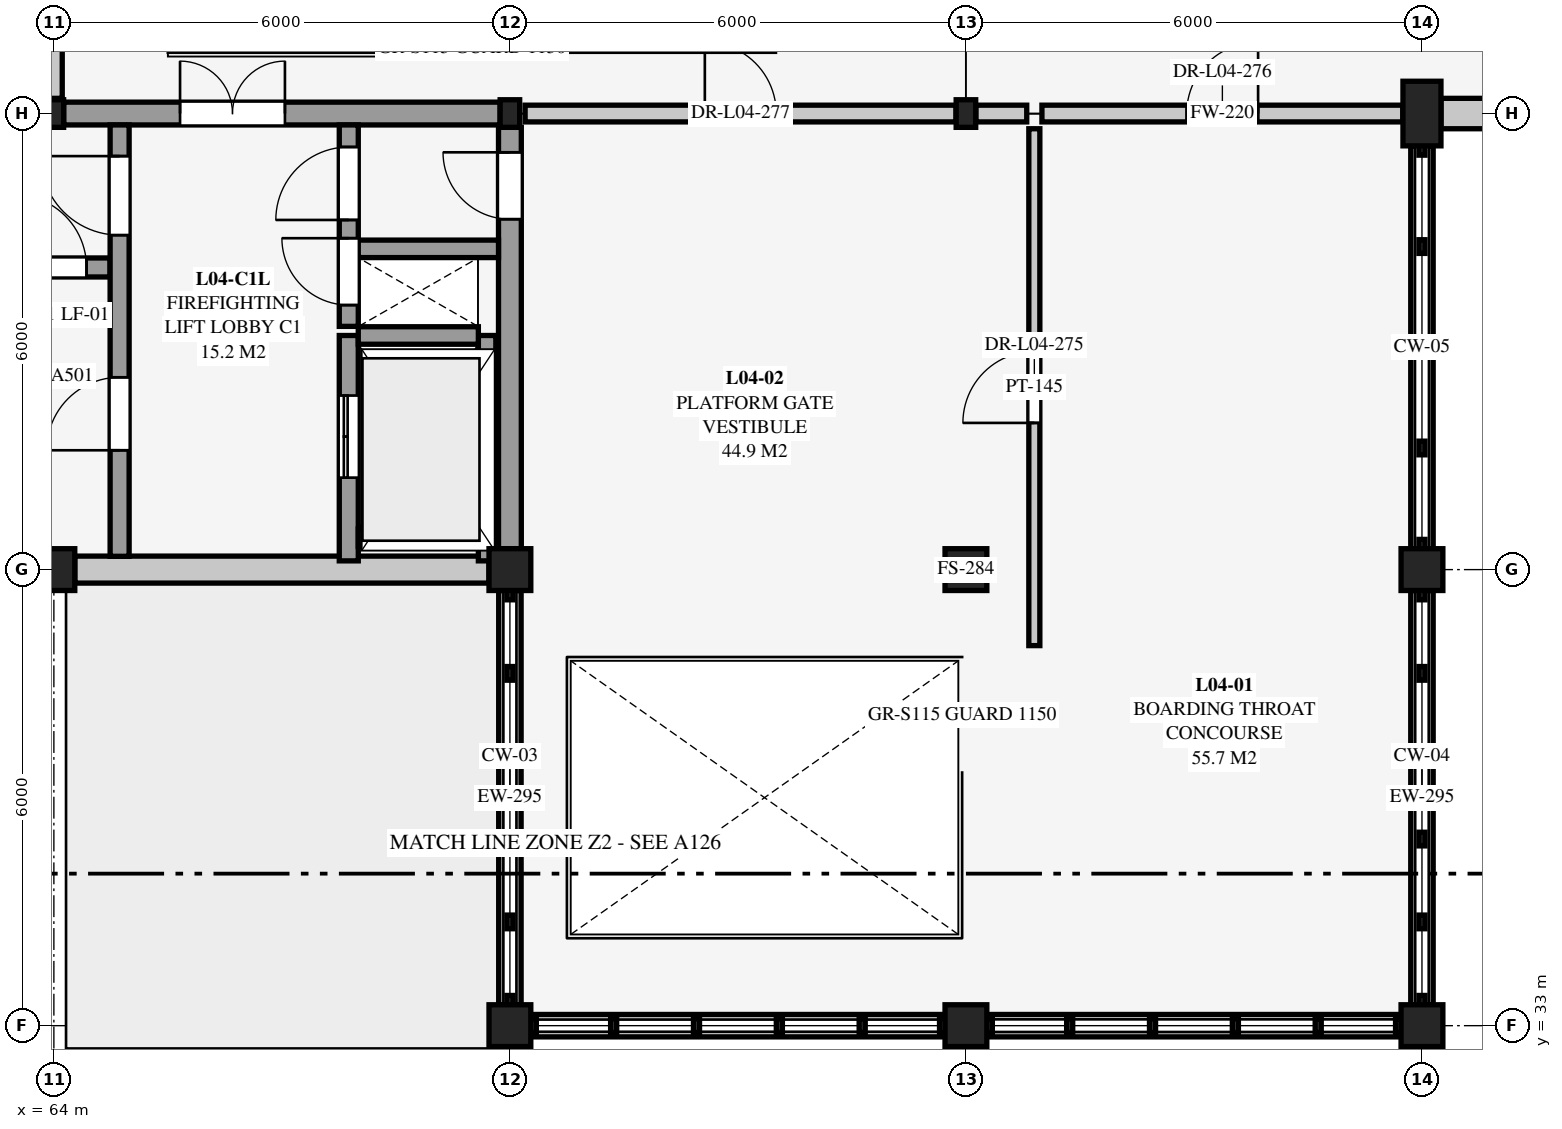
"""IFC4 building model, lengths in metres.
Left out: names, types, materials, properties, quantities, classifications, styles, units other than length and angle.
Written with IfcOpenShell. Run it as: python <this file> out.ifc"""

import sys

from ifc_helpers import new_model, si_unit, direction, frame, frame_2d, origin, origin_2d, place, context, subcontext, project, spatial, rectangle, i_section, extrude, element, fill, save


model = new_model("IFC4")
c1 = context("Model", 3, precision=1e-05, world=origin(), true_north=direction((0.0, 1.0)))
c2 = subcontext(c1, "Body", "Model", "MODEL_VIEW")
j1 = project(units=[si_unit("LENGTHUNIT", "METRE"), si_unit("PLANEANGLEUNIT", "RADIAN")], contexts=[c1])
p1 = place(None, origin())
s1 = spatial("IfcSite", under=j1, at=p1, CompositionType="ELEMENT")
p2 = place(p1, origin())
s2 = spatial("IfcBuilding", under=s1, at=p2, CompositionType="ELEMENT")
p3 = place(p2, frame((0.0, 0.0, 13.5)))
s3 = spatial("IfcBuildingStorey", under=s2, at=p3, CompositionType="ELEMENT", Elevation=13.5)
p4 = place(p3, frame((64.0, 39.0, 0.0), z_axis=(0.0, 0.0, 1.0), x_axis=(1.0, 0.0, 0.0)))
e1 = element("IfcColumn", 1, at=p4, inside=s3, PredefinedType="COLUMN", context=c2, shape_type="SweptSolid", body=[
    extrude(rectangle(XDim=0.55, YDim=0.55, at=origin_2d()), origin(), (0.0, 0.0, 1.0), 4.5),
])
p5 = place(p3, frame((64.0, 45.0, 0.0), z_axis=(0.0, 0.0, 1.0), x_axis=(1.0, 0.0, 0.0)))
e2 = element("IfcColumn", 2, at=p5, inside=s3, PredefinedType="COLUMN", context=c2, shape_type="SweptSolid", body=[
    extrude(i_section(OverallWidth=0.257, OverallDepth=0.363, WebThickness=0.013, FlangeThickness=0.022, at=origin_2d()), origin(), (0.0, 0.0, 1.0), 4.5),
])
for number, where, z_axis, x_axis in (
    (3, (70.0, 33.0, 0.0), (0.0, 0.0, 1.0), (1.0, 0.0, 0.0)),
    (4, (70.0, 39.0, 0.0), (0.0, 0.0, 1.0), (1.0, 0.0, 0.0)),
):
    element("IfcColumn", number, at=place(p3, frame(where, z_axis=z_axis, x_axis=x_axis)), inside=s3, PredefinedType="COLUMN", context=c2, shape_type="SweptSolid", body=[
        extrude(rectangle(XDim=0.55, YDim=0.55, at=origin_2d()), origin(), (0.0, 0.0, 1.0), 4.5),
    ])
p6 = place(p3, frame((70.0, 45.0, 0.0), z_axis=(0.0, 0.0, 1.0), x_axis=(1.0, 0.0, 0.0)))
e5 = element("IfcColumn", 5, at=p6, inside=s3, PredefinedType="COLUMN", context=c2, shape_type="SweptSolid", body=[
    extrude(i_section(OverallWidth=0.257, OverallDepth=0.363, WebThickness=0.013, FlangeThickness=0.022, at=origin_2d()), origin(), (0.0, 0.0, 1.0), 4.5),
])
for number, where, z_axis, x_axis in (
    (6, (76.0, 33.0, 0.0), (0.0, 0.0, 1.0), (1.0, 0.0, 0.0)),
    (7, (76.0, 39.0, 0.0), (0.0, 0.0, 1.0), (1.0, 0.0, 0.0)),
):
    element("IfcColumn", number, at=place(p3, frame(where, z_axis=z_axis, x_axis=x_axis)), inside=s3, PredefinedType="COLUMN", context=c2, shape_type="SweptSolid", body=[
        extrude(rectangle(XDim=0.55, YDim=0.55, at=origin_2d()), origin(), (0.0, 0.0, 1.0), 4.5),
    ])
p7 = place(p3, frame((76.0, 45.0, 0.0), z_axis=(0.0, 0.0, 1.0), x_axis=(1.0, 0.0, 0.0)))
e8 = element("IfcColumn", 8, at=p7, inside=s3, PredefinedType="COLUMN", context=c2, shape_type="SweptSolid", body=[
    extrude(i_section(OverallWidth=0.257, OverallDepth=0.363, WebThickness=0.013, FlangeThickness=0.022, at=origin_2d()), origin(), (0.0, 0.0, 1.0), 4.5),
])
for number, where, z_axis, x_axis in (
    (9, (82.0, 33.0, 0.0), (0.0, 0.0, 1.0), (1.0, 0.0, 0.0)),
    (10, (82.0, 39.0, 0.0), (0.0, 0.0, 1.0), (1.0, 0.0, 0.0)),
):
    element("IfcColumn", number, at=place(p3, frame(where, z_axis=z_axis, x_axis=x_axis)), inside=s3, PredefinedType="COLUMN", context=c2, shape_type="SweptSolid", body=[
        extrude(rectangle(XDim=0.55, YDim=0.55, at=origin_2d()), origin(), (0.0, 0.0, 1.0), 4.5),
    ])
p8 = place(p3, frame((82.0, 45.0, 0.0), z_axis=(0.0, 0.0, 1.0), x_axis=(1.0, 0.0, 0.0)))
e11 = element("IfcColumn", 11, at=p8, inside=s3, PredefinedType="PILASTER", context=c2, shape_type="SweptSolid", body=[
    extrude(rectangle(XDim=0.5, YDim=0.85, at=origin_2d()), origin(), (0.0, 0.0, 1.0), 4.5),
])
p9 = place(p3, frame((69.725, 39.0, 0.0), z_axis=(0.0, 0.0, 1.0), x_axis=(-1.0, 0.0, 0.0)))
e12 = element("IfcWall", 12, at=p9, inside=s3, PredefinedType="SOLIDWALL", context=c2, shape_type="SweptSolid", body=[
    extrude(rectangle(XDim=5.45, YDim=0.355, at=frame_2d((2.725, 0.0))), origin(), (0.0, 0.0, 1.0), 3.741),
])
p10 = place(p3, frame((75.725, 33.0, 0.0), z_axis=(0.0, 0.0, 1.0), x_axis=(-1.0, 0.0, 0.0)))
e13 = element("IfcWall", 13, at=p10, inside=s3, PredefinedType="SOLIDWALL", context=c2, shape_type="SweptSolid", body=[
    extrude(rectangle(XDim=5.45, YDim=0.295, at=frame_2d((2.725, 0.0))), origin(), (0.0, 0.0, 1.0), 0.16),
])
p11 = place(p3, frame((81.725, 33.0, 0.0), z_axis=(0.0, 0.0, 1.0), x_axis=(-1.0, 0.0, 0.0)))
e14 = element("IfcWall", 14, at=p11, inside=s3, PredefinedType="SOLIDWALL", context=c2, shape_type="SweptSolid", body=[
    extrude(rectangle(XDim=5.45, YDim=0.295, at=frame_2d((2.725, 0.0))), origin(), (0.0, 0.0, 1.0), 0.21),
])
p12 = place(p3, frame((70.0, 33.275, 0.0), z_axis=(0.0, 0.0, 1.0), x_axis=(0.0, 1.0, 0.0)))
e15 = element("IfcWall", 15, at=p12, inside=s3, PredefinedType="SOLIDWALL", context=c2, shape_type="SweptSolid", body=[
    extrude(rectangle(XDim=5.45, YDim=0.295, at=frame_2d((2.725, 0.0))), origin(), (0.0, 0.0, 1.0), 0.26),
])
p13 = place(p3, frame((82.0, 38.725, 0.0), z_axis=(0.0, 0.0, 1.0), x_axis=(0.0, -1.0, 0.0)))
e16 = element("IfcWall", 16, at=p13, inside=s3, PredefinedType="SOLIDWALL", context=c2, shape_type="SweptSolid", body=[
    extrude(rectangle(XDim=5.45, YDim=0.295, at=frame_2d((2.725, 0.0))), origin(), (0.0, 0.0, 1.0), 0.31),
])
p14 = place(p3, frame((82.0, 44.575, 0.0), z_axis=(0.0, 0.0, 1.0), x_axis=(0.0, -1.0, 0.0)))
e17 = element("IfcWall", 17, at=p14, inside=s3, PredefinedType="SOLIDWALL", context=c2, shape_type="SweptSolid", body=[
    extrude(rectangle(XDim=5.3, YDim=0.295, at=frame_2d((2.65, 0.0))), origin(), (0.0, 0.0, 1.0), 0.36),
])
p15 = place(p3, frame((87.75, 45.0, 0.0), z_axis=(0.0, 0.0, 1.0), x_axis=(-1.0, 0.0, 0.0)))
e18 = element("IfcWall", 18, at=p15, inside=s3, PredefinedType="SOLIDWALL", context=c2, shape_type="SweptSolid", body=[
    extrude(rectangle(XDim=5.5, YDim=0.4, at=frame_2d((2.75, 0.0))), origin(), (0.0, 0.0, 1.0), 8.593),
])
p16 = place(p15, frame((2.1, 0.0, 1.3)))
e19 = element("IfcOpeningElement", 19, at=p16, cuts=e18, PredefinedType="OPENING", context=c2, shape_type="SweptSolid", body=[
    extrude(rectangle(XDim=1.3, YDim=1.45, at=frame_2d((0.65, 0.725))), frame((0.0, 0.21, 0.0), z_axis=(0.0, -1.0, 0.0), x_axis=(1.0, 0.0, 0.0)), (0.0, 0.0, 1.0), 0.42),
])
p17 = place(p3, frame((64.128, 45.0, 0.0), z_axis=(0.0, 0.0, 1.0), x_axis=(1.0, 0.0, 0.0)))
e20 = element("IfcWall", 20, at=p17, inside=s3, PredefinedType="SHEAR", context=c2, shape_type="SweptSolid", body=[
    extrude(rectangle(XDim=5.743, YDim=0.3, at=frame_2d((2.872, 0.0))), origin(), (0.0, 0.0, 1.0), 4.204),
])
p18 = place(p17, frame((1.531, 0.0, 0.0)))
e21 = element("IfcOpeningElement", 21, at=p18, cuts=e20, PredefinedType="OPENING", context=c2, shape_type="SweptSolid", body=[
    extrude(rectangle(XDim=1.38, YDim=2.16, at=frame_2d((0.69, 1.08))), frame((0.0, 0.16, 0.0), z_axis=(0.0, -1.0, 0.0), x_axis=(1.0, 0.0, 0.0)), (0.0, 0.0, 1.0), 0.32),
])
p19 = place(p3, frame((70.0, 39.275, 0.0), z_axis=(0.0, 0.0, 1.0), x_axis=(0.0, 1.0, 0.0)))
e22 = element("IfcWall", 22, at=p19, inside=s3, PredefinedType="SHEAR", context=c2, shape_type="SweptSolid", body=[
    extrude(rectangle(XDim=5.544, YDim=0.3, at=frame_2d((2.772, 0.0))), origin(), (0.0, 0.0, 1.0), 4.204),
])
p20 = place(p19, frame((4.335, 0.0, 0.0)))
e23 = element("IfcOpeningElement", 23, at=p20, cuts=e22, PredefinedType="OPENING", context=c2, shape_type="SweptSolid", body=[
    extrude(rectangle(XDim=0.88, YDim=2.08, at=frame_2d((0.44, 1.04))), frame((0.0, 0.16, 0.0), z_axis=(0.0, -1.0, 0.0), x_axis=(1.0, 0.0, 0.0)), (0.0, 0.0, 1.0), 0.32),
])
p21 = place(p3, frame((63.16, 42.975, 0.0), z_axis=(0.0, 0.0, 1.0), x_axis=(1.0, 0.0, 0.0)))
e24 = element("IfcWall", 24, at=p21, inside=s3, PredefinedType="SHEAR", context=c2, shape_type="SweptSolid", body=[
    extrude(rectangle(XDim=1.58, YDim=0.25, at=frame_2d((0.79, 0.0))), origin(), (0.0, 0.0, 1.0), 4.204),
])
p22 = place(p21, frame((0.31, 0.0, 0.0)))
e25 = element("IfcOpeningElement", 25, at=p22, cuts=e24, PredefinedType="OPENING", context=c2, shape_type="SweptSolid", body=[
    extrude(rectangle(XDim=0.96, YDim=2.12, at=frame_2d((0.48, 1.06))), frame((0.0, 0.135, 0.0), z_axis=(0.0, -1.0, 0.0), x_axis=(1.0, 0.0, 0.0)), (0.0, 0.0, 1.0), 0.27),
])
p23 = place(p3, frame((64.865, 39.175, 0.0), z_axis=(0.0, 0.0, 1.0), x_axis=(0.0, 1.0, 0.0)))
e26 = element("IfcWall", 26, at=p23, inside=s3, PredefinedType="SHEAR", context=c2, shape_type="SweptSolid", body=[
    extrude(rectangle(XDim=5.675, YDim=0.25, at=frame_2d((2.837, 0.0))), origin(), (0.0, 0.0, 1.0), 4.204),
])
p24 = place(p23, frame((4.225, 0.0, 0.0)))
e27 = element("IfcOpeningElement", 27, at=p24, cuts=e26, PredefinedType="OPENING", context=c2, shape_type="SweptSolid", body=[
    extrude(rectangle(XDim=1.04, YDim=2.14, at=frame_2d((0.52, 1.07))), frame((0.0, 0.135, 0.0), z_axis=(0.0, -1.0, 0.0), x_axis=(1.0, 0.0, 0.0)), (0.0, 0.0, 1.0), 0.27),
])
p25 = place(p23, frame((1.395, 0.0, 0.0)))
e28 = element("IfcOpeningElement", 28, at=p25, cuts=e26, PredefinedType="OPENING", context=c2, shape_type="SweptSolid", body=[
    extrude(rectangle(XDim=0.96, YDim=2.12, at=frame_2d((0.48, 1.06))), frame((0.0, 0.135, 0.0), z_axis=(0.0, -1.0, 0.0), x_axis=(1.0, 0.0, 0.0)), (0.0, 0.0, 1.0), 0.27),
])
p26 = place(p3, frame((67.88, 39.115, 0.0), z_axis=(0.0, 0.0, 1.0), x_axis=(0.0, 1.0, 0.0)))
e29 = element("IfcWall", 29, at=p26, inside=s3, PredefinedType="SHEAR", context=c2, shape_type="SweptSolid", body=[
    extrude(rectangle(XDim=2.965, YDim=0.25, at=frame_2d((1.482, 0.0))), origin(), (0.0, 0.0, 1.0), 4.5),
])
p27 = place(p26, frame((1.095, 0.0, 0.0)))
e30 = element("IfcOpeningElement", 30, at=p27, cuts=e29, PredefinedType="OPENING", context=c2, shape_type="SweptSolid", body=[
    extrude(rectangle(XDim=1.08, YDim=2.15, at=frame_2d((0.54, 1.075))), frame((0.0, 0.135, 0.0), z_axis=(0.0, -1.0, 0.0), x_axis=(1.0, 0.0, 0.0)), (0.0, 0.0, 1.0), 0.27),
])
p28 = place(p3, frame((68.005, 39.42, 0.0), z_axis=(0.0, 0.0, 1.0), x_axis=(1.0, 0.0, 0.0)))
e31 = element("IfcWall", 31, at=p28, inside=s3, PredefinedType="SHEAR", context=c2, shape_type="SweptSolid", body=[
    extrude(rectangle(XDim=1.58, YDim=0.23, at=frame_2d((0.79, 0.0))), origin(), (0.0, 0.0, 1.0), 4.5),
])
p29 = place(p3, frame((69.7, 39.115, 0.0), z_axis=(0.0, 0.0, 1.0), x_axis=(0.0, 1.0, 0.0)))
e32 = element("IfcWall", 32, at=p29, inside=s3, PredefinedType="SHEAR", context=c2, shape_type="SweptSolid", body=[
    extrude(rectangle(XDim=2.965, YDim=0.23, at=frame_2d((1.482, 0.0))), origin(), (0.0, 0.0, 1.0), 4.5),
])
p30 = place(p3, frame((68.005, 42.08, 0.0), z_axis=(0.0, 0.0, 1.0), x_axis=(1.0, 0.0, 0.0)))
e33 = element("IfcWall", 33, at=p30, inside=s3, PredefinedType="SHEAR", context=c2, shape_type="SweptSolid", body=[
    extrude(rectangle(XDim=1.58, YDim=0.23, at=frame_2d((0.79, 0.0))), origin(), (0.0, 0.0, 1.0), 4.5),
])
p31 = place(p3, frame((67.88, 42.2, 0.0), z_axis=(0.0, 0.0, 1.0), x_axis=(0.0, 1.0, 0.0)))
e34 = element("IfcWall", 34, at=p31, inside=s3, PredefinedType="SHEAR", context=c2, shape_type="SweptSolid", body=[
    extrude(rectangle(XDim=2.65, YDim=0.25, at=frame_2d((1.325, 0.0))), origin(), (0.0, 0.0, 1.0), 4.204),
])
p32 = place(p31, frame((0.28, 0.0, 0.0)))
e35 = element("IfcOpeningElement", 35, at=p32, cuts=e34, PredefinedType="OPENING", context=c2, shape_type="SweptSolid", body=[
    extrude(rectangle(XDim=0.88, YDim=2.08, at=frame_2d((0.44, 1.04))), frame((0.0, 0.135, 0.0), z_axis=(0.0, -1.0, 0.0), x_axis=(1.0, 0.0, 0.0)), (0.0, 0.0, 1.0), 0.27),
])
p33 = place(p31, frame((1.4, 0.0, 0.0)))
e36 = element("IfcOpeningElement", 36, at=p33, cuts=e34, PredefinedType="OPENING", context=c2, shape_type="SweptSolid", body=[
    extrude(rectangle(XDim=0.96, YDim=2.12, at=frame_2d((0.48, 1.06))), frame((0.0, 0.135, 0.0), z_axis=(0.0, -1.0, 0.0), x_axis=(1.0, 0.0, 0.0)), (0.0, 0.0, 1.0), 0.27),
])
p34 = place(p3, frame((68.005, 43.22, 0.0), z_axis=(0.0, 0.0, 1.0), x_axis=(1.0, 0.0, 0.0)))
e37 = element("IfcWall", 37, at=p34, inside=s3, PredefinedType="SHEAR", context=c2, shape_type="SweptSolid", body=[
    extrude(rectangle(XDim=1.845, YDim=0.23, at=frame_2d((0.923, 0.0))), origin(), (0.0, 0.0, 1.0), 4.204),
])
p35 = place(p3, frame((76.9, 38.0, 0.0), z_axis=(0.0, 0.0, 1.0), x_axis=(0.0, 1.0, 0.0)))
e38 = element("IfcWall", 38, at=p35, inside=s3, PredefinedType="PARTITIONING", context=c2, shape_type="SweptSolid", body=[
    extrude(rectangle(XDim=6.8, YDim=0.145, at=frame_2d((3.4, 0.0))), origin(), (0.0, 0.0, 1.0), 4.204),
])
p36 = place(p35, frame((2.93, 0.0, 0.0)))
e39 = element("IfcOpeningElement", 39, at=p36, cuts=e38, PredefinedType="OPENING", context=c2, shape_type="SweptSolid", body=[
    extrude(rectangle(XDim=0.94, YDim=2.1, at=frame_2d((0.47, 1.05))), frame((0.0, 0.083, 0.0), z_axis=(0.0, -1.0, 0.0), x_axis=(1.0, 0.0, 0.0)), (0.0, 0.0, 1.0), 0.165),
])
p37 = place(p3, frame((77.0, 45.0, 0.0), z_axis=(0.0, 0.0, 1.0), x_axis=(1.0, 0.0, 0.0)))
e40 = element("IfcWall", 40, at=p37, inside=s3, PredefinedType="SOLIDWALL", context=c2, shape_type="SweptSolid", body=[
    extrude(rectangle(XDim=4.748, YDim=0.22, at=frame_2d((2.374, 0.0))), origin(), (0.0, 0.0, 1.0), 3.85),
])
p38 = place(p37, frame((1.904, 0.0, 0.0)))
e41 = element("IfcOpeningElement", 41, at=p38, cuts=e40, PredefinedType="OPENING", context=c2, shape_type="SweptSolid", body=[
    extrude(rectangle(XDim=0.94, YDim=2.1, at=frame_2d((0.47, 1.05))), frame((0.0, 0.12, 0.0), z_axis=(0.0, -1.0, 0.0), x_axis=(1.0, 0.0, 0.0)), (0.0, 0.0, 1.0), 0.24),
])
p39 = place(p3, frame((70.2, 45.0, 0.0), z_axis=(0.0, 0.0, 1.0), x_axis=(1.0, 0.0, 0.0)))
e42 = element("IfcWall", 42, at=p39, inside=s3, PredefinedType="SOLIDWALL", context=c2, shape_type="SweptSolid", body=[
    extrude(rectangle(XDim=5.669, YDim=0.22, at=frame_2d((2.835, 0.0))), origin(), (0.0, 0.0, 1.0), 3.747),
])
p40 = place(p39, frame((2.365, 0.0, 0.0)))
e43 = element("IfcOpeningElement", 43, at=p40, cuts=e42, PredefinedType="OPENING", context=c2, shape_type="SweptSolid", body=[
    extrude(rectangle(XDim=0.94, YDim=2.1, at=frame_2d((0.47, 1.05))), frame((0.0, 0.12, 0.0), z_axis=(0.0, -1.0, 0.0), x_axis=(1.0, 0.0, 0.0)), (0.0, 0.0, 1.0), 0.24),
])
p41 = place(p3, frame((76.131, 45.0, 0.0), z_axis=(0.0, 0.0, 1.0), x_axis=(1.0, 0.0, 0.0)))
e44 = element("IfcWall", 44, at=p41, inside=s3, PredefinedType="SOLIDWALL", context=c2, shape_type="SweptSolid", body=[
    extrude(rectangle(XDim=0.669, YDim=0.22, at=frame_2d((0.335, 0.0))), origin(), (0.0, 0.0, 1.0), 3.85),
])
p42 = place(p3, frame((64.0, 45.2, 0.0), z_axis=(0.0, 0.0, 1.0), x_axis=(0.0, 1.0, 0.0)))
e45 = element("IfcWall", 45, at=p42, inside=s3, PredefinedType="SOLIDWALL", context=c2, shape_type="SweptSolid", body=[
    extrude(rectangle(XDim=5.4, YDim=0.22, at=frame_2d((2.7, 0.0))), origin(), (0.0, 0.0, 1.0), 3.747),
])
p43 = place(p42, frame((2.23, 0.0, 0.0)))
e46 = element("IfcOpeningElement", 46, at=p43, cuts=e45, PredefinedType="OPENING", context=c2, shape_type="SweptSolid", body=[
    extrude(rectangle(XDim=0.94, YDim=2.1, at=frame_2d((0.47, 1.05))), frame((0.0, 0.12, 0.0), z_axis=(0.0, -1.0, 0.0), x_axis=(1.0, 0.0, 0.0)), (0.0, 0.0, 1.0), 0.24),
])
p44 = place(p18, origin())
e47 = element("IfcDoor", 47, at=p44, inside=s3, OperationType="DOUBLE_DOOR_SINGLE_SWING", PredefinedType="DOOR", context=c2, shape_type="SweptSolid", body=[
    extrude(rectangle(XDim=1.38, YDim=2.16, at=frame_2d((0.69, 1.08))), frame((0.0, 0.025, 0.0), z_axis=(0.0, -1.0, 0.0), x_axis=(1.0, 0.0, 0.0)), (0.0, 0.0, 1.0), 0.05),
])
fill(e21, e47)
p45 = place(p20, origin())
e48 = element("IfcDoor", 48, at=p45, inside=s3, OperationType="SINGLE_SWING_RIGHT", PredefinedType="DOOR", context=c2, shape_type="SweptSolid", body=[
    extrude(rectangle(XDim=0.88, YDim=2.08, at=frame_2d((0.44, 1.04))), frame((0.0, 0.025, 0.0), z_axis=(0.0, -1.0, 0.0), x_axis=(1.0, 0.0, 0.0)), (0.0, 0.0, 1.0), 0.05),
])
fill(e23, e48)
p46 = place(p22, origin())
e49 = element("IfcDoor", 49, at=p46, inside=s3, OperationType="SINGLE_SWING_LEFT", PredefinedType="DOOR", context=c2, shape_type="SweptSolid", body=[
    extrude(rectangle(XDim=0.96, YDim=2.12, at=frame_2d((0.48, 1.06))), frame((0.0, 0.025, 0.0), z_axis=(0.0, -1.0, 0.0), x_axis=(1.0, 0.0, 0.0)), (0.0, 0.0, 1.0), 0.05),
])
fill(e25, e49)
p47 = place(p24, origin())
e50 = element("IfcDoor", 50, at=p47, inside=s3, OperationType="SINGLE_SWING_RIGHT", PredefinedType="DOOR", context=c2, shape_type="SweptSolid", body=[
    extrude(rectangle(XDim=1.04, YDim=2.14, at=frame_2d((0.52, 1.07))), frame((0.0, 0.025, 0.0), z_axis=(0.0, -1.0, 0.0), x_axis=(1.0, 0.0, 0.0)), (0.0, 0.0, 1.0), 0.05),
])
fill(e27, e50)
p48 = place(p25, origin())
e51 = element("IfcDoor", 51, at=p48, inside=s3, OperationType="SINGLE_SWING_LEFT", PredefinedType="DOOR", context=c2, shape_type="SweptSolid", body=[
    extrude(rectangle(XDim=0.96, YDim=2.12, at=frame_2d((0.48, 1.06))), frame((0.0, 0.025, 0.0), z_axis=(0.0, -1.0, 0.0), x_axis=(1.0, 0.0, 0.0)), (0.0, 0.0, 1.0), 0.05),
])
fill(e28, e51)
p49 = place(p27, origin())
e52 = element("IfcDoor", 52, at=p49, inside=s3, OperationType="DOUBLE_DOOR_SLIDING", PredefinedType="DOOR", context=c2, shape_type="SweptSolid", body=[
    extrude(rectangle(XDim=1.08, YDim=2.15, at=frame_2d((0.54, 1.075))), frame((0.0, 0.025, 0.0), z_axis=(0.0, -1.0, 0.0), x_axis=(1.0, 0.0, 0.0)), (0.0, 0.0, 1.0), 0.05),
])
fill(e30, e52)
p50 = place(p32, origin())
e53 = element("IfcDoor", 53, at=p50, inside=s3, OperationType="SINGLE_SWING_RIGHT", PredefinedType="DOOR", context=c2, shape_type="SweptSolid", body=[
    extrude(rectangle(XDim=0.88, YDim=2.08, at=frame_2d((0.44, 1.04))), frame((0.0, 0.025, 0.0), z_axis=(0.0, -1.0, 0.0), x_axis=(1.0, 0.0, 0.0)), (0.0, 0.0, 1.0), 0.05),
])
fill(e35, e53)
p51 = place(p33, origin())
e54 = element("IfcDoor", 54, at=p51, inside=s3, OperationType="SINGLE_SWING_LEFT", PredefinedType="DOOR", context=c2, shape_type="SweptSolid", body=[
    extrude(rectangle(XDim=0.96, YDim=2.12, at=frame_2d((0.48, 1.06))), frame((0.0, 0.025, 0.0), z_axis=(0.0, -1.0, 0.0), x_axis=(1.0, 0.0, 0.0)), (0.0, 0.0, 1.0), 0.05),
])
fill(e36, e54)
p52 = place(p36, origin())
e55 = element("IfcDoor", 55, at=p52, inside=s3, OperationType="SINGLE_SWING_LEFT", PredefinedType="DOOR", context=c2, shape_type="SweptSolid", body=[
    extrude(rectangle(XDim=0.94, YDim=2.1, at=frame_2d((0.47, 1.05))), frame((0.0, 0.025, 0.0), z_axis=(0.0, -1.0, 0.0), x_axis=(1.0, 0.0, 0.0)), (0.0, 0.0, 1.0), 0.05),
])
fill(e39, e55)
p53 = place(p38, origin())
e56 = element("IfcDoor", 56, at=p53, inside=s3, OperationType="SINGLE_SWING_RIGHT", PredefinedType="DOOR", context=c2, shape_type="SweptSolid", body=[
    extrude(rectangle(XDim=0.94, YDim=2.1, at=frame_2d((0.47, 1.05))), frame((0.0, 0.025, 0.0), z_axis=(0.0, -1.0, 0.0), x_axis=(1.0, 0.0, 0.0)), (0.0, 0.0, 1.0), 0.05),
])
fill(e41, e56)
p54 = place(p40, origin())
e57 = element("IfcDoor", 57, at=p54, inside=s3, OperationType="SINGLE_SWING_LEFT", PredefinedType="DOOR", context=c2, shape_type="SweptSolid", body=[
    extrude(rectangle(XDim=0.94, YDim=2.1, at=frame_2d((0.47, 1.05))), frame((0.0, 0.025, 0.0), z_axis=(0.0, -1.0, 0.0), x_axis=(1.0, 0.0, 0.0)), (0.0, 0.0, 1.0), 0.05),
])
fill(e43, e57)
save(model, sys.argv[1])
